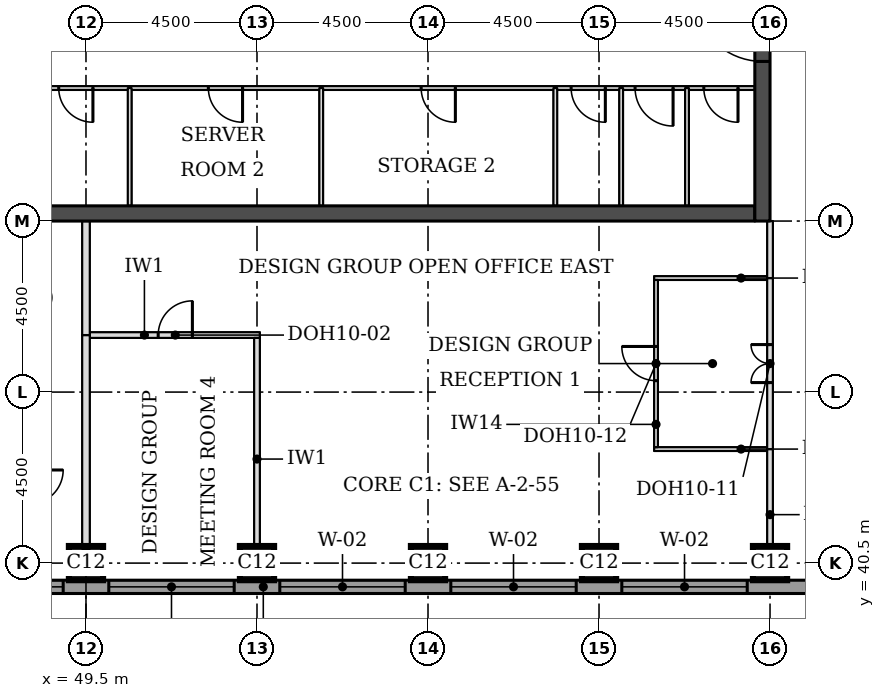
"""IFC4 building model, lengths in metres.
Left out: names, types, materials, properties, quantities, classifications, styles, units other than length and angle.
Written with IfcOpenShell. Run it as: python <this file> out.ifc"""

import sys

from ifc_helpers import new_model, si_unit, direction, frame, frame_2d, origin, origin_2d, place, context, subcontext, project, spatial, rectangle, extrude, element, fill, save


model = new_model("IFC4")
c1 = context("Model", 3, precision=1e-05, world=origin(), true_north=direction((0.0, 1.0)))
c2 = subcontext(c1, "Body", "Model", "MODEL_VIEW")
j1 = project(units=[si_unit("LENGTHUNIT", "METRE"), si_unit("PLANEANGLEUNIT", "RADIAN")], contexts=[c1])
p1 = place(None, origin())
s1 = spatial("IfcSite", under=j1, at=p1, CompositionType="ELEMENT")
p2 = place(p1, origin())
s2 = spatial("IfcBuilding", under=s1, at=p2, CompositionType="ELEMENT")
p3 = place(p2, frame((0.0, 0.0, 223.0)))
s3 = spatial("IfcBuildingStorey", under=s2, at=p3, CompositionType="ELEMENT", Elevation=223.0)
for number, where, z_axis, x_axis in (
    (1, (49.5, 40.5, 0.0), (0.0, 0.0, 1.0), (1.0, 0.0, 0.0)),
    (2, (54.0, 40.5, 0.0), (0.0, 0.0, 1.0), (1.0, 0.0, 0.0)),
    (3, (58.5, 40.5, 0.0), (0.0, 0.0, 1.0), (1.0, 0.0, 0.0)),
    (4, (63.0, 40.5, 0.0), (0.0, 0.0, 1.0), (1.0, 0.0, 0.0)),
    (5, (67.5, 40.5, 0.0), (0.0, 0.0, 1.0), (1.0, 0.0, 0.0)),
):
    element("IfcColumn", number, at=place(p3, frame(where, z_axis=z_axis, x_axis=x_axis)), inside=s3, PredefinedType="COLUMN", context=c2, shape_type="SweptSolid", body=[
        extrude(rectangle(XDim=0.9, YDim=0.9, at=origin_2d()), origin(), (0.0, 0.0, 1.0), 3.7),
    ])
p4 = place(p3, frame((45.4, 49.7, 0.0), z_axis=(0.0, 0.0, 1.0), x_axis=(1.0, 0.0, 0.0)))
e6 = element("IfcWall", 6, at=p4, inside=s3, PredefinedType="SHEAR", context=c2, shape_type="SweptSolid", body=[
    extrude(rectangle(XDim=21.7, YDim=0.4, at=frame_2d((10.85, 0.0))), origin(), (0.0, 0.0, 1.0), 3.7),
])
p5 = place(p3, frame((67.3, 49.5, 0.0), z_axis=(0.0, 0.0, 1.0), x_axis=(0.0, 1.0, 0.0)))
e7 = element("IfcWall", 7, at=p5, inside=s3, PredefinedType="SHEAR", context=c2, shape_type="SweptSolid", body=[
    extrude(rectangle(XDim=22.5, YDim=0.4, at=frame_2d((11.25, 0.0))), origin(), (0.0, 0.0, 1.0), 3.7),
])
p6 = place(p5, frame((4.2, 0.0, 0.0)))
e8 = element("IfcOpeningElement", 8, at=p6, cuts=e7, PredefinedType="OPENING", context=c2, shape_type="SweptSolid", body=[
    extrude(rectangle(XDim=1.8, YDim=2.1, at=frame_2d((0.9, 1.05))), frame((0.0, 0.21, 0.0), z_axis=(0.0, -1.0, 0.0), x_axis=(1.0, 0.0, 0.0)), (0.0, 0.0, 1.0), 0.42),
])
p7 = place(p5, frame((6.9, 0.0, 0.0)))
e9 = element("IfcOpeningElement", 9, at=p7, cuts=e7, PredefinedType="OPENING", context=c2, shape_type="SweptSolid", body=[
    extrude(rectangle(XDim=1.1, YDim=2.1, at=frame_2d((0.55, 1.05))), frame((0.0, 0.21, 0.0), z_axis=(0.0, -1.0, 0.0), x_axis=(1.0, 0.0, 0.0)), (0.0, 0.0, 1.0), 0.42),
])
p8 = place(p5, frame((13.6, 0.0, 0.0)))
e10 = element("IfcOpeningElement", 10, at=p8, cuts=e7, PredefinedType="OPENING", context=c2, shape_type="SweptSolid", body=[
    extrude(rectangle(XDim=1.1, YDim=2.1, at=frame_2d((0.55, 1.05))), frame((0.0, 0.21, 0.0), z_axis=(0.0, -1.0, 0.0), x_axis=(1.0, 0.0, 0.0)), (0.0, 0.0, 1.0), 0.42),
])
p9 = place(p5, frame((16.5, 0.0, 0.0)))
e11 = element("IfcOpeningElement", 11, at=p9, cuts=e7, PredefinedType="OPENING", context=c2, shape_type="SweptSolid", body=[
    extrude(rectangle(XDim=1.8, YDim=2.1, at=frame_2d((0.9, 1.05))), frame((0.0, 0.21, 0.0), z_axis=(0.0, -1.0, 0.0), x_axis=(1.0, 0.0, 0.0)), (0.0, 0.0, 1.0), 0.42),
])
p10 = place(p3, frame((36.0, 39.875, 0.0), z_axis=(0.0, 0.0, 1.0), x_axis=(1.0, 0.0, 0.0)))
e12 = element("IfcWall", 12, at=p10, inside=s3, PredefinedType="STANDARD", context=c2, shape_type="SweptSolid", body=[
    extrude(rectangle(XDim=36.331, YDim=0.35, at=frame_2d((18.166, 0.0))), origin(), (0.0, 0.0, 1.0), 3.525),
])
p11 = place(p10, frame((5.1, 0.0, 0.9)))
e13 = element("IfcOpeningElement", 13, at=p11, cuts=e12, PredefinedType="OPENING", context=c2, shape_type="SweptSolid", body=[
    extrude(rectangle(XDim=3.3, YDim=1.9, at=frame_2d((1.65, 0.95))), frame((0.0, 0.185, 0.0), z_axis=(0.0, -1.0, 0.0), x_axis=(1.0, 0.0, 0.0)), (0.0, 0.0, 1.0), 0.37),
])
p12 = place(p10, frame((9.6, 0.0, 0.9)))
e14 = element("IfcOpeningElement", 14, at=p12, cuts=e12, PredefinedType="OPENING", context=c2, shape_type="SweptSolid", body=[
    extrude(rectangle(XDim=3.3, YDim=1.9, at=frame_2d((1.65, 0.95))), frame((0.0, 0.185, 0.0), z_axis=(0.0, -1.0, 0.0), x_axis=(1.0, 0.0, 0.0)), (0.0, 0.0, 1.0), 0.37),
])
p13 = place(p10, frame((14.1, 0.0, 0.9)))
e15 = element("IfcOpeningElement", 15, at=p13, cuts=e12, PredefinedType="OPENING", context=c2, shape_type="SweptSolid", body=[
    extrude(rectangle(XDim=3.3, YDim=1.9, at=frame_2d((1.65, 0.95))), frame((0.0, 0.185, 0.0), z_axis=(0.0, -1.0, 0.0), x_axis=(1.0, 0.0, 0.0)), (0.0, 0.0, 1.0), 0.37),
])
p14 = place(p10, frame((18.6, 0.0, 0.9)))
e16 = element("IfcOpeningElement", 16, at=p14, cuts=e12, PredefinedType="OPENING", context=c2, shape_type="SweptSolid", body=[
    extrude(rectangle(XDim=3.3, YDim=1.9, at=frame_2d((1.65, 0.95))), frame((0.0, 0.185, 0.0), z_axis=(0.0, -1.0, 0.0), x_axis=(1.0, 0.0, 0.0)), (0.0, 0.0, 1.0), 0.37),
])
p15 = place(p10, frame((23.1, 0.0, 0.9)))
e17 = element("IfcOpeningElement", 17, at=p15, cuts=e12, PredefinedType="OPENING", context=c2, shape_type="SweptSolid", body=[
    extrude(rectangle(XDim=3.3, YDim=1.9, at=frame_2d((1.65, 0.95))), frame((0.0, 0.185, 0.0), z_axis=(0.0, -1.0, 0.0), x_axis=(1.0, 0.0, 0.0)), (0.0, 0.0, 1.0), 0.37),
])
p16 = place(p10, frame((27.6, 0.0, 0.9)))
e18 = element("IfcOpeningElement", 18, at=p16, cuts=e12, PredefinedType="OPENING", context=c2, shape_type="SweptSolid", body=[
    extrude(rectangle(XDim=3.3, YDim=1.9, at=frame_2d((1.65, 0.95))), frame((0.0, 0.185, 0.0), z_axis=(0.0, -1.0, 0.0), x_axis=(1.0, 0.0, 0.0)), (0.0, 0.0, 1.0), 0.37),
])
p17 = place(p3, frame((64.45, 43.5, 0.0), z_axis=(0.0, 0.0, 1.0), x_axis=(1.0, 0.0, 0.0)))
e19 = element("IfcWall", 19, at=p17, inside=s3, PredefinedType="PARTITIONING", context=c2, shape_type="SweptSolid", body=[
    extrude(rectangle(XDim=2.975, YDim=0.1, at=frame_2d((1.488, 0.0))), origin(), (0.0, 0.0, 1.0), 3.55),
])
p18 = place(p3, frame((49.6, 46.5, 0.0), z_axis=(0.0, 0.0, 1.0), x_axis=(1.0, 0.0, 0.0)))
e20 = element("IfcWall", 20, at=p18, inside=s3, PredefinedType="PARTITIONING", context=c2, shape_type="SweptSolid", body=[
    extrude(rectangle(XDim=4.475, YDim=0.15, at=frame_2d((2.237, 0.0))), origin(), (0.0, 0.0, 1.0), 3.55),
])
p19 = place(p18, frame((1.8, 0.0, 0.0)))
e21 = element("IfcOpeningElement", 21, at=p19, cuts=e20, PredefinedType="OPENING", context=c2, shape_type="SweptSolid", body=[
    extrude(rectangle(XDim=0.9, YDim=2.1, at=frame_2d((0.45, 1.05))), frame((0.0, 0.085, 0.0), z_axis=(0.0, -1.0, 0.0), x_axis=(1.0, 0.0, 0.0)), (0.0, 0.0, 1.0), 0.17),
])
p20 = place(p3, frame((64.45, 48.0, 0.0), z_axis=(0.0, 0.0, 1.0), x_axis=(1.0, 0.0, 0.0)))
e22 = element("IfcWall", 22, at=p20, inside=s3, PredefinedType="PARTITIONING", context=c2, shape_type="SweptSolid", body=[
    extrude(rectangle(XDim=2.975, YDim=0.1, at=frame_2d((1.488, 0.0))), origin(), (0.0, 0.0, 1.0), 3.55),
])
p21 = place(p3, frame((49.5, 40.05, 0.0), z_axis=(0.0, 0.0, 1.0), x_axis=(0.0, 1.0, 0.0)))
e23 = element("IfcWall", 23, at=p21, inside=s3, PredefinedType="PARTITIONING", context=c2, shape_type="SweptSolid", body=[
    extrude(rectangle(XDim=6.45, YDim=0.2, at=frame_2d((3.225, 0.0))), origin(), (0.0, 0.0, 1.0), 3.55),
])
p22 = place(p3, frame((54.0, 40.05, 0.0), z_axis=(0.0, 0.0, 1.0), x_axis=(0.0, 1.0, 0.0)))
e24 = element("IfcWall", 24, at=p22, inside=s3, PredefinedType="PARTITIONING", context=c2, shape_type="SweptSolid", body=[
    extrude(rectangle(XDim=6.375, YDim=0.15, at=frame_2d((3.188, 0.0))), origin(), (0.0, 0.0, 1.0), 3.55),
])
p23 = place(p3, frame((67.5, 40.05, 0.0), z_axis=(0.0, 0.0, 1.0), x_axis=(0.0, 1.0, 0.0)))
e25 = element("IfcWall", 25, at=p23, inside=s3, PredefinedType="PARTITIONING", context=c2, shape_type="SweptSolid", body=[
    extrude(rectangle(XDim=3.45, YDim=0.15, at=frame_2d((1.725, 0.0))), origin(), (0.0, 0.0, 1.0), 3.022),
])
p24 = place(p3, frame((67.5, 43.5, 0.0), z_axis=(0.0, 0.0, 1.0), x_axis=(0.0, 1.0, 0.0)))
e26 = element("IfcWall", 26, at=p24, inside=s3, PredefinedType="PARTITIONING", context=c2, shape_type="SweptSolid", body=[
    extrude(rectangle(XDim=4.5, YDim=0.15, at=frame_2d((2.25, 0.0))), origin(), (0.0, 0.0, 1.0), 3.022),
])
p25 = place(p24, frame((1.75, 0.0, 0.0)))
e27 = element("IfcOpeningElement", 27, at=p25, cuts=e26, PredefinedType="OPENING", context=c2, shape_type="SweptSolid", body=[
    extrude(rectangle(XDim=1.0, YDim=2.1, at=frame_2d((0.5, 1.05))), frame((0.0, 0.085, 0.0), z_axis=(0.0, -1.0, 0.0), x_axis=(1.0, 0.0, 0.0)), (0.0, 0.0, 1.0), 0.17),
])
p26 = place(p3, frame((64.5, 43.55, 0.0), z_axis=(0.0, 0.0, 1.0), x_axis=(0.0, 1.0, 0.0)))
e28 = element("IfcWall", 28, at=p26, inside=s3, PredefinedType="PARTITIONING", context=c2, shape_type="SweptSolid", body=[
    extrude(rectangle(XDim=4.4, YDim=0.1, at=frame_2d((2.2, 0.0))), origin(), (0.0, 0.0, 1.0), 3.55),
])
p27 = place(p26, frame((1.75, 0.0, 0.0)))
e29 = element("IfcOpeningElement", 29, at=p27, cuts=e28, PredefinedType="OPENING", context=c2, shape_type="SweptSolid", body=[
    extrude(rectangle(XDim=0.9, YDim=2.1, at=frame_2d((0.45, 1.05))), frame((0.0, 0.06, 0.0), z_axis=(0.0, -1.0, 0.0), x_axis=(1.0, 0.0, 0.0)), (0.0, 0.0, 1.0), 0.12),
])
p28 = place(p3, frame((49.5, 46.5, 0.0), z_axis=(0.0, 0.0, 1.0), x_axis=(0.0, 1.0, 0.0)))
e30 = element("IfcWall", 30, at=p28, inside=s3, PredefinedType="PARTITIONING", context=c2, shape_type="SweptSolid", body=[
    extrude(rectangle(XDim=3.0, YDim=0.2, at=frame_2d((1.5, 0.0))), origin(), (0.0, 0.0, 1.0), 3.55),
])
p29 = place(p3, frame((67.5, 48.0, 0.0), z_axis=(0.0, 0.0, 1.0), x_axis=(0.0, 1.0, 0.0)))
e31 = element("IfcWall", 31, at=p29, inside=s3, PredefinedType="PARTITIONING", context=c2, shape_type="SweptSolid", body=[
    extrude(rectangle(XDim=1.5, YDim=0.15, at=frame_2d((0.75, 0.0))), origin(), (0.0, 0.0, 1.0), 3.022),
])
p30 = place(p3, frame((45.4, 53.0, 0.0), z_axis=(0.0, 0.0, 1.0), x_axis=(1.0, 0.0, 0.0)))
e32 = element("IfcWall", 32, at=p30, inside=s3, PredefinedType="PARTITIONING", context=c2, shape_type="SweptSolid", body=[
    extrude(rectangle(XDim=21.7, YDim=0.1, at=frame_2d((10.85, 0.0))), origin(), (0.0, 0.0, 1.0), 3.55),
])
p31 = place(p30, frame((20.357, 0.0, 0.0)))
e33 = element("IfcOpeningElement", 33, at=p31, cuts=e32, PredefinedType="OPENING", context=c2, shape_type="SweptSolid", body=[
    extrude(rectangle(XDim=0.9, YDim=2.1, at=frame_2d((0.45, 1.05))), frame((0.0, 0.06, 0.0), z_axis=(0.0, -1.0, 0.0), x_axis=(1.0, 0.0, 0.0)), (0.0, 0.0, 1.0), 0.12),
])
p32 = place(p30, frame((18.549, 0.0, 0.0)))
e34 = element("IfcOpeningElement", 34, at=p32, cuts=e32, PredefinedType="OPENING", context=c2, shape_type="SweptSolid", body=[
    extrude(rectangle(XDim=1.0, YDim=2.1, at=frame_2d((0.5, 1.05))), frame((0.0, 0.06, 0.0), z_axis=(0.0, -1.0, 0.0), x_axis=(1.0, 0.0, 0.0)), (0.0, 0.0, 1.0), 0.12),
])
p33 = place(p30, frame((16.866, 0.0, 0.0)))
e35 = element("IfcOpeningElement", 35, at=p33, cuts=e32, PredefinedType="OPENING", context=c2, shape_type="SweptSolid", body=[
    extrude(rectangle(XDim=0.9, YDim=2.1, at=frame_2d((0.45, 1.05))), frame((0.0, 0.06, 0.0), z_axis=(0.0, -1.0, 0.0), x_axis=(1.0, 0.0, 0.0)), (0.0, 0.0, 1.0), 0.12),
])
p34 = place(p30, frame((0.758, 0.0, 0.0)))
e36 = element("IfcOpeningElement", 36, at=p34, cuts=e32, PredefinedType="OPENING", context=c2, shape_type="SweptSolid", body=[
    extrude(rectangle(XDim=0.9, YDim=2.1, at=frame_2d((0.45, 1.05))), frame((0.0, 0.06, 0.0), z_axis=(0.0, -1.0, 0.0), x_axis=(1.0, 0.0, 0.0)), (0.0, 0.0, 1.0), 0.12),
])
p35 = place(p30, frame((3.383, 0.0, 0.0)))
e37 = element("IfcOpeningElement", 37, at=p35, cuts=e32, PredefinedType="OPENING", context=c2, shape_type="SweptSolid", body=[
    extrude(rectangle(XDim=0.9, YDim=2.1, at=frame_2d((0.45, 1.05))), frame((0.0, 0.06, 0.0), z_axis=(0.0, -1.0, 0.0), x_axis=(1.0, 0.0, 0.0)), (0.0, 0.0, 1.0), 0.12),
])
p36 = place(p30, frame((7.32, 0.0, 0.0)))
e38 = element("IfcOpeningElement", 38, at=p36, cuts=e32, PredefinedType="OPENING", context=c2, shape_type="SweptSolid", body=[
    extrude(rectangle(XDim=0.9, YDim=2.1, at=frame_2d((0.45, 1.05))), frame((0.0, 0.06, 0.0), z_axis=(0.0, -1.0, 0.0), x_axis=(1.0, 0.0, 0.0)), (0.0, 0.0, 1.0), 0.12),
])
p37 = place(p30, frame((12.92, 0.0, 0.0)))
e39 = element("IfcOpeningElement", 39, at=p37, cuts=e32, PredefinedType="OPENING", context=c2, shape_type="SweptSolid", body=[
    extrude(rectangle(XDim=0.9, YDim=2.1, at=frame_2d((0.45, 1.05))), frame((0.0, 0.06, 0.0), z_axis=(0.0, -1.0, 0.0), x_axis=(1.0, 0.0, 0.0)), (0.0, 0.0, 1.0), 0.12),
])
for number, where, z_axis, x_axis in (
    (40, (50.65, 49.9, 0.0), (0.0, 0.0, 1.0), (0.0, 1.0, 0.0)),
    (41, (55.69, 49.9, 0.0), (0.0, 0.0, 1.0), (0.0, 1.0, 0.0)),
    (42, (61.85, 49.9, 0.0), (0.0, 0.0, 1.0), (0.0, 1.0, 0.0)),
    (43, (63.583, 49.9, 0.0), (0.0, 0.0, 1.0), (0.0, 1.0, 0.0)),
    (44, (65.315, 49.9, 0.0), (0.0, 0.0, 1.0), (0.0, 1.0, 0.0)),
):
    element("IfcWall", number, at=place(p3, frame(where, z_axis=z_axis, x_axis=x_axis)), inside=s3, PredefinedType="PARTITIONING", context=c2, shape_type="SweptSolid", body=[
        extrude(rectangle(XDim=3.1, YDim=0.1, at=frame_2d((1.55, 0.0))), origin(), (0.0, 0.0, 1.0), 3.55),
    ])
p38 = place(p12, origin())
e45 = element("IfcWindow", 45, at=p38, inside=s3, PartitioningType="SINGLE_PANEL", PredefinedType="WINDOW", context=c2, shape_type="SweptSolid", body=[
    extrude(rectangle(XDim=3.3, YDim=1.9, at=frame_2d((1.65, 0.95))), frame((0.0, 0.085, 0.0), z_axis=(0.0, -1.0, 0.0), x_axis=(1.0, 0.0, 0.0)), (0.0, 0.0, 1.0), 0.06),
])
fill(e14, e45)
p39 = place(p13, origin())
e46 = element("IfcWindow", 46, at=p39, inside=s3, PartitioningType="SINGLE_PANEL", PredefinedType="WINDOW", context=c2, shape_type="SweptSolid", body=[
    extrude(rectangle(XDim=3.3, YDim=1.9, at=frame_2d((1.65, 0.95))), frame((0.0, 0.085, 0.0), z_axis=(0.0, -1.0, 0.0), x_axis=(1.0, 0.0, 0.0)), (0.0, 0.0, 1.0), 0.06),
])
fill(e15, e46)
p40 = place(p14, origin())
e47 = element("IfcWindow", 47, at=p40, inside=s3, PartitioningType="SINGLE_PANEL", PredefinedType="WINDOW", context=c2, shape_type="SweptSolid", body=[
    extrude(rectangle(XDim=3.3, YDim=1.9, at=frame_2d((1.65, 0.95))), frame((0.0, 0.085, 0.0), z_axis=(0.0, -1.0, 0.0), x_axis=(1.0, 0.0, 0.0)), (0.0, 0.0, 1.0), 0.06),
])
fill(e16, e47)
p41 = place(p15, origin())
e48 = element("IfcWindow", 48, at=p41, inside=s3, PartitioningType="SINGLE_PANEL", PredefinedType="WINDOW", context=c2, shape_type="SweptSolid", body=[
    extrude(rectangle(XDim=3.3, YDim=1.9, at=frame_2d((1.65, 0.95))), frame((0.0, 0.085, 0.0), z_axis=(0.0, -1.0, 0.0), x_axis=(1.0, 0.0, 0.0)), (0.0, 0.0, 1.0), 0.06),
])
fill(e17, e48)
p42 = place(p16, origin())
e49 = element("IfcWindow", 49, at=p42, inside=s3, PartitioningType="SINGLE_PANEL", PredefinedType="WINDOW", context=c2, shape_type="SweptSolid", body=[
    extrude(rectangle(XDim=3.3, YDim=1.9, at=frame_2d((1.65, 0.95))), frame((0.0, 0.085, 0.0), z_axis=(0.0, -1.0, 0.0), x_axis=(1.0, 0.0, 0.0)), (0.0, 0.0, 1.0), 0.06),
])
fill(e18, e49)
p43 = place(p25, origin())
e50 = element("IfcDoor", 50, at=p43, inside=s3, OperationType="DOUBLE_DOOR_SINGLE_SWING", PredefinedType="DOOR", context=c2, shape_type="SweptSolid", body=[
    extrude(rectangle(XDim=1.0, YDim=2.1, at=frame_2d((0.5, 1.05))), frame((0.0, 0.025, 0.0), z_axis=(0.0, -1.0, 0.0), x_axis=(1.0, 0.0, 0.0)), (0.0, 0.0, 1.0), 0.05),
])
fill(e27, e50)
p44 = place(p27, origin())
e51 = element("IfcDoor", 51, at=p44, inside=s3, OperationType="SINGLE_SWING_RIGHT", PredefinedType="DOOR", context=c2, shape_type="SweptSolid", body=[
    extrude(rectangle(XDim=0.9, YDim=2.1, at=frame_2d((0.45, 1.05))), frame((0.0, 0.025, 0.0), z_axis=(0.0, -1.0, 0.0), x_axis=(1.0, 0.0, 0.0)), (0.0, 0.0, 1.0), 0.05),
])
fill(e29, e51)
p45 = place(p19, origin())
e52 = element("IfcDoor", 52, at=p45, inside=s3, OperationType="SINGLE_SWING_RIGHT", PredefinedType="DOOR", context=c2, shape_type="SweptSolid", body=[
    extrude(rectangle(XDim=0.9, YDim=2.1, at=frame_2d((0.45, 1.05))), frame((0.0, 0.025, 0.0), z_axis=(0.0, -1.0, 0.0), x_axis=(1.0, 0.0, 0.0)), (0.0, 0.0, 1.0), 0.05),
])
fill(e21, e52)
p46 = place(p6, origin())
e53 = element("IfcDoor", 53, at=p46, inside=s3, OperationType="SINGLE_SWING_RIGHT", PredefinedType="DOOR", context=c2, shape_type="SweptSolid", body=[
    extrude(rectangle(XDim=1.8, YDim=2.1, at=frame_2d((0.9, 1.05))), frame((0.0, 0.025, 0.0), z_axis=(0.0, -1.0, 0.0), x_axis=(1.0, 0.0, 0.0)), (0.0, 0.0, 1.0), 0.05),
])
fill(e8, e53)
p47 = place(p31, frame((0.9, 0.0, 0.0), z_axis=(0.0, 0.0, 1.0), x_axis=(-1.0, 0.0, 0.0)))
e54 = element("IfcDoor", 54, at=p47, inside=s3, OperationType="SINGLE_SWING_LEFT", PredefinedType="DOOR", context=c2, shape_type="SweptSolid", body=[
    extrude(rectangle(XDim=0.9, YDim=2.1, at=frame_2d((0.45, 1.05))), frame((0.0, 0.025, 0.0), z_axis=(0.0, -1.0, 0.0), x_axis=(1.0, 0.0, 0.0)), (0.0, 0.0, 1.0), 0.05),
])
fill(e33, e54)
p48 = place(p32, frame((1.0, 0.0, 0.0), z_axis=(0.0, 0.0, 1.0), x_axis=(-1.0, 0.0, 0.0)))
e55 = element("IfcDoor", 55, at=p48, inside=s3, OperationType="SINGLE_SWING_LEFT", PredefinedType="DOOR", context=c2, shape_type="SweptSolid", body=[
    extrude(rectangle(XDim=1.0, YDim=2.1, at=frame_2d((0.5, 1.05))), frame((0.0, 0.025, 0.0), z_axis=(0.0, -1.0, 0.0), x_axis=(1.0, 0.0, 0.0)), (0.0, 0.0, 1.0), 0.05),
])
fill(e34, e55)
p49 = place(p33, frame((0.9, 0.0, 0.0), z_axis=(0.0, 0.0, 1.0), x_axis=(-1.0, 0.0, 0.0)))
e56 = element("IfcDoor", 56, at=p49, inside=s3, OperationType="SINGLE_SWING_LEFT", PredefinedType="DOOR", context=c2, shape_type="SweptSolid", body=[
    extrude(rectangle(XDim=0.9, YDim=2.1, at=frame_2d((0.45, 1.05))), frame((0.0, 0.025, 0.0), z_axis=(0.0, -1.0, 0.0), x_axis=(1.0, 0.0, 0.0)), (0.0, 0.0, 1.0), 0.05),
])
fill(e35, e56)
p50 = place(p35, frame((0.9, 0.0, 0.0), z_axis=(0.0, 0.0, 1.0), x_axis=(-1.0, 0.0, 0.0)))
e57 = element("IfcDoor", 57, at=p50, inside=s3, OperationType="SINGLE_SWING_LEFT", PredefinedType="DOOR", context=c2, shape_type="SweptSolid", body=[
    extrude(rectangle(XDim=0.9, YDim=2.1, at=frame_2d((0.45, 1.05))), frame((0.0, 0.025, 0.0), z_axis=(0.0, -1.0, 0.0), x_axis=(1.0, 0.0, 0.0)), (0.0, 0.0, 1.0), 0.05),
])
fill(e37, e57)
p51 = place(p36, frame((0.9, 0.0, 0.0), z_axis=(0.0, 0.0, 1.0), x_axis=(-1.0, 0.0, 0.0)))
e58 = element("IfcDoor", 58, at=p51, inside=s3, OperationType="SINGLE_SWING_LEFT", PredefinedType="DOOR", context=c2, shape_type="SweptSolid", body=[
    extrude(rectangle(XDim=0.9, YDim=2.1, at=frame_2d((0.45, 1.05))), frame((0.0, 0.025, 0.0), z_axis=(0.0, -1.0, 0.0), x_axis=(1.0, 0.0, 0.0)), (0.0, 0.0, 1.0), 0.05),
])
fill(e38, e58)
p52 = place(p37, frame((0.9, 0.0, 0.0), z_axis=(0.0, 0.0, 1.0), x_axis=(-1.0, 0.0, 0.0)))
e59 = element("IfcDoor", 59, at=p52, inside=s3, OperationType="SINGLE_SWING_LEFT", PredefinedType="DOOR", context=c2, shape_type="SweptSolid", body=[
    extrude(rectangle(XDim=0.9, YDim=2.1, at=frame_2d((0.45, 1.05))), frame((0.0, 0.025, 0.0), z_axis=(0.0, -1.0, 0.0), x_axis=(1.0, 0.0, 0.0)), (0.0, 0.0, 1.0), 0.05),
])
fill(e39, e59)
save(model, sys.argv[1])
